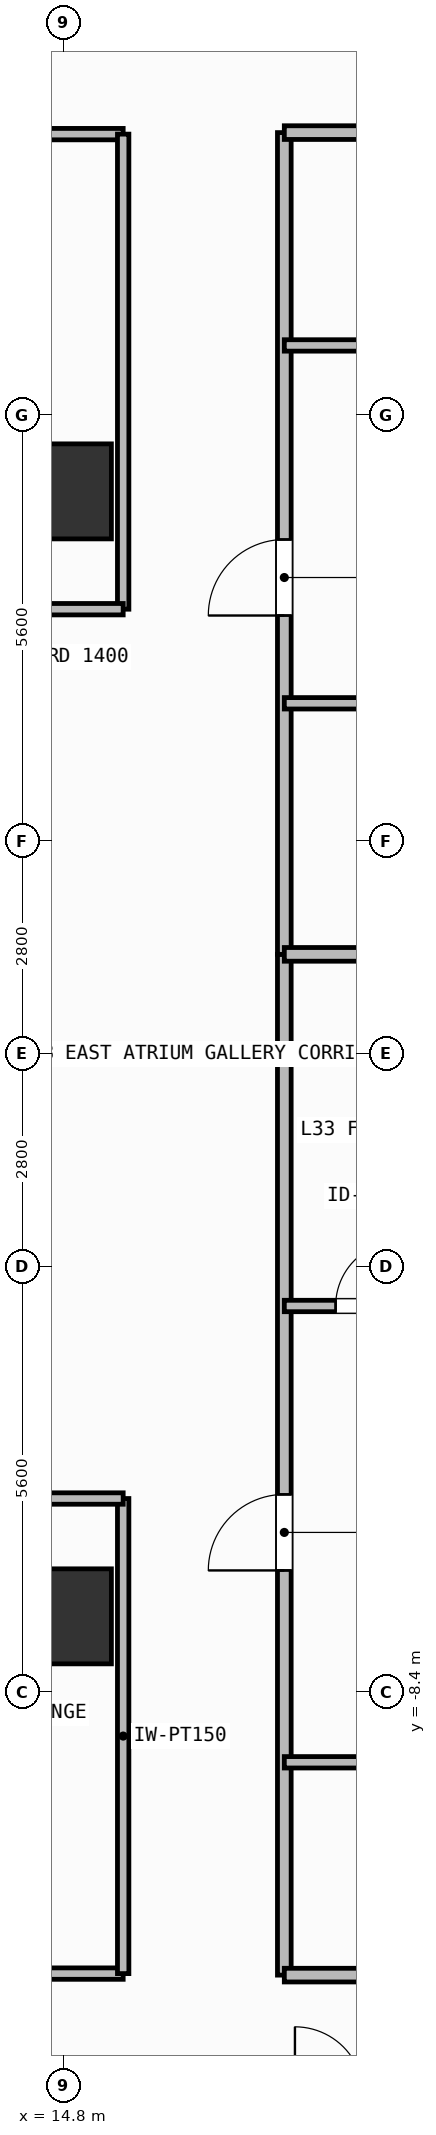
"""IFC4 building model, lengths in metres.
Left out: names, types, materials, properties, quantities, classifications, styles, units other than length and angle.
Written with IfcOpenShell. Run it as: python <this file> out.ifc"""

import sys

from ifc_helpers import new_model, si_unit, direction, frame, frame_2d, origin, origin_2d, place, context, subcontext, project, spatial, rectangle, extrude, element, fill, save


model = new_model("IFC4")
c1 = context("Model", 3, precision=1e-05, world=origin(), true_north=direction((0.0, 1.0)))
c2 = subcontext(c1, "Body", "Model", "MODEL_VIEW")
j1 = project(units=[si_unit("LENGTHUNIT", "METRE"), si_unit("PLANEANGLEUNIT", "RADIAN")], contexts=[c1])
p1 = place(None, origin())
s1 = spatial("IfcSite", under=j1, at=p1, CompositionType="ELEMENT")
p2 = place(p1, origin())
s2 = spatial("IfcBuilding", under=s1, at=p2, CompositionType="ELEMENT")
p3 = place(p2, frame((0.0, 0.0, 132.9)))
s3 = spatial("IfcBuildingStorey", under=s2, at=p3, CompositionType="ELEMENT", Elevation=132.9)
for number, where, z_axis, x_axis in (
    (1, (14.8, -7.4, 0.0), (0.0, 0.0, 1.0), (1.0, 0.0, 0.0)),
    (2, (14.8, 7.4, 0.0), (0.0, 0.0, 1.0), (1.0, 0.0, 0.0)),
):
    element("IfcColumn", number, at=place(p3, frame(where, z_axis=z_axis, x_axis=x_axis)), inside=s3, PredefinedType="COLUMN", context=c2, shape_type="SweptSolid", body=[
        extrude(rectangle(XDim=1.25, YDim=1.25, at=origin_2d()), origin(), (0.0, 0.0, 1.0), 3.9),
    ])
p4 = place(p3, frame((10.1, -12.1, 0.0), z_axis=(0.0, 0.0, 1.0), x_axis=(1.0, 0.0, 0.0)))
e3 = element("IfcWall", 3, at=p4, inside=s3, PredefinedType="PARTITIONING", context=c2, shape_type="SweptSolid", body=[
    extrude(rectangle(XDim=5.48, YDim=0.15, at=frame_2d((2.74, 0.0))), origin(), (0.0, 0.0, 1.0), 3.62),
])
p5 = place(p4, frame((2.29, 0.0, 0.0)))
e4 = element("IfcOpeningElement", 4, at=p5, cuts=e3, PredefinedType="OPENING", context=c2, shape_type="SweptSolid", body=[
    extrude(rectangle(XDim=0.9, YDim=2.1, at=frame_2d((0.45, 1.05))), frame((0.0, 0.085, 0.0), z_axis=(0.0, -1.0, 0.0), x_axis=(1.0, 0.0, 0.0)), (0.0, 0.0, 1.0), 0.17),
])
p6 = place(p3, frame((8.36, 12.1, 0.0), z_axis=(0.0, 0.0, 1.0), x_axis=(1.0, 0.0, 0.0)))
e5 = element("IfcWall", 5, at=p6, inside=s3, PredefinedType="PARTITIONING", context=c2, shape_type="SweptSolid", body=[
    extrude(rectangle(XDim=7.22, YDim=0.15, at=frame_2d((3.61, 0.0))), origin(), (0.0, 0.0, 1.0), 3.62),
])
p7 = place(p6, frame((3.513, 0.0, 0.0)))
e6 = element("IfcOpeningElement", 6, at=p7, cuts=e5, PredefinedType="OPENING", context=c2, shape_type="SweptSolid", body=[
    extrude(rectangle(XDim=0.9, YDim=2.1, at=frame_2d((0.45, 1.05))), frame((0.0, 0.085, 0.0), z_axis=(0.0, -1.0, 0.0), x_axis=(1.0, 0.0, 0.0)), (0.0, 0.0, 1.0), 0.17),
])
p8 = place(p3, frame((17.7, -12.12, 0.0), z_axis=(0.0, 0.0, 1.0), x_axis=(0.0, 1.0, 0.0)))
e7 = element("IfcWall", 7, at=p8, inside=s3, PredefinedType="PARTITIONING", context=c2, shape_type="SweptSolid", body=[
    extrude(rectangle(XDim=13.429, YDim=0.18, at=frame_2d((6.715, 0.0))), origin(), (0.0, 0.0, 1.0), 3.62),
])
p9 = place(p8, frame((5.324, 0.0, 0.0)))
e8 = element("IfcOpeningElement", 8, at=p9, cuts=e7, PredefinedType="OPENING", context=c2, shape_type="SweptSolid", body=[
    extrude(rectangle(XDim=1.0, YDim=2.2, at=frame_2d((0.5, 1.1))), frame((0.0, 0.1, 0.0), z_axis=(0.0, -1.0, 0.0), x_axis=(1.0, 0.0, 0.0)), (0.0, 0.0, 1.0), 0.2),
])
p10 = place(p3, frame((17.7, -3.317, 0.0), z_axis=(0.0, 0.0, 1.0), x_axis=(1.0, 0.0, 0.0)))
e9 = element("IfcWall", 9, at=p10, inside=s3, PredefinedType="PARTITIONING", context=c2, shape_type="SweptSolid", body=[
    extrude(rectangle(XDim=2.372, YDim=0.15, at=frame_2d((1.186, 0.0))), origin(), (0.0, 0.0, 1.0), 3.62),
])
p11 = place(p10, frame((0.675, 0.0, 0.0)))
e10 = element("IfcOpeningElement", 10, at=p11, cuts=e9, PredefinedType="OPENING", context=c2, shape_type="SweptSolid", body=[
    extrude(rectangle(XDim=0.85, YDim=2.1, at=frame_2d((0.425, 1.05))), frame((0.0, 0.085, 0.0), z_axis=(0.0, -1.0, 0.0), x_axis=(1.0, 0.0, 0.0)), (0.0, 0.0, 1.0), 0.17),
])
p12 = place(p3, frame((17.7, -9.32, 0.0), z_axis=(0.0, 0.0, 1.0), x_axis=(1.0, 0.0, 0.0)))
e11 = element("IfcWall", 11, at=p12, inside=s3, PredefinedType="PARTITIONING", context=c2, shape_type="SweptSolid", body=[
    extrude(rectangle(XDim=5.786, YDim=0.15, at=frame_2d((2.893, 0.0))), origin(), (0.0, 0.0, 1.0), 3.62),
])
p13 = place(p12, frame((2.468, 0.0, 0.0)))
e12 = element("IfcOpeningElement", 12, at=p13, cuts=e11, PredefinedType="OPENING", context=c2, shape_type="SweptSolid", body=[
    extrude(rectangle(XDim=0.85, YDim=2.1, at=frame_2d((0.425, 1.05))), frame((0.0, 0.085, 0.0), z_axis=(0.0, -1.0, 0.0), x_axis=(1.0, 0.0, 0.0)), (0.0, 0.0, 1.0), 0.17),
])
p14 = place(p3, frame((17.7, 1.309, 0.0), z_axis=(0.0, 0.0, 1.0), x_axis=(0.0, 1.0, 0.0)))
e13 = element("IfcWall", 13, at=p14, inside=s3, PredefinedType="PARTITIONING", context=c2, shape_type="SweptSolid", body=[
    extrude(rectangle(XDim=10.811, YDim=0.18, at=frame_2d((5.406, 0.0))), origin(), (0.0, 0.0, 1.0), 3.62),
])
p15 = place(p14, frame((4.458, 0.0, 0.0)))
e14 = element("IfcOpeningElement", 14, at=p15, cuts=e13, PredefinedType="OPENING", context=c2, shape_type="SweptSolid", body=[
    extrude(rectangle(XDim=1.0, YDim=2.2, at=frame_2d((0.5, 1.1))), frame((0.0, 0.1, 0.0), z_axis=(0.0, -1.0, 0.0), x_axis=(1.0, 0.0, 0.0)), (0.0, 0.0, 1.0), 0.2),
])
p16 = place(p3, frame((17.7, 9.32, 0.0), z_axis=(0.0, 0.0, 1.0), x_axis=(1.0, 0.0, 0.0)))
e15 = element("IfcWall", 15, at=p16, inside=s3, PredefinedType="PARTITIONING", context=c2, shape_type="SweptSolid", body=[
    extrude(rectangle(XDim=5.59, YDim=0.15, at=frame_2d((2.795, 0.0))), origin(), (0.0, 0.0, 1.0), 3.62),
])
p17 = place(p16, frame((2.458, 0.0, 0.0)))
e16 = element("IfcOpeningElement", 16, at=p17, cuts=e15, PredefinedType="OPENING", context=c2, shape_type="SweptSolid", body=[
    extrude(rectangle(XDim=0.85, YDim=2.1, at=frame_2d((0.425, 1.05))), frame((0.0, 0.085, 0.0), z_axis=(0.0, -1.0, 0.0), x_axis=(1.0, 0.0, 0.0)), (0.0, 0.0, 1.0), 0.17),
])
p18 = place(p3, frame((17.7, 4.612, 0.0), z_axis=(0.0, 0.0, 1.0), x_axis=(1.0, 0.0, 0.0)))
e17 = element("IfcWall", 17, at=p18, inside=s3, PredefinedType="PARTITIONING", context=c2, shape_type="SweptSolid", body=[
    extrude(rectangle(XDim=5.59, YDim=0.15, at=frame_2d((2.795, 0.0))), origin(), (0.0, 0.0, 1.0), 3.62),
])
p19 = place(p18, frame((2.281, 0.0, 0.0)))
e18 = element("IfcOpeningElement", 18, at=p19, cuts=e17, PredefinedType="OPENING", context=c2, shape_type="SweptSolid", body=[
    extrude(rectangle(XDim=0.85, YDim=2.1, at=frame_2d((0.425, 1.05))), frame((0.0, 0.085, 0.0), z_axis=(0.0, -1.0, 0.0), x_axis=(1.0, 0.0, 0.0)), (0.0, 0.0, 1.0), 0.17),
])
p20 = place(p3, frame((15.58, -12.1, 0.0), z_axis=(0.0, 0.0, 1.0), x_axis=(0.0, 1.0, 0.0)))
e19 = element("IfcWall", 19, at=p20, inside=s3, PredefinedType="PARTITIONING", context=c2, shape_type="SweptSolid", body=[
    extrude(rectangle(XDim=6.25, YDim=0.15, at=frame_2d((3.125, 0.0))), origin(), (0.0, 0.0, 1.0), 3.62),
])
p21 = place(p3, frame((8.96, -5.85, 0.0), z_axis=(0.0, 0.0, 1.0), x_axis=(1.0, 0.0, 0.0)))
e20 = element("IfcWall", 20, at=p21, inside=s3, PredefinedType="PARTITIONING", context=c2, shape_type="SweptSolid", body=[
    extrude(rectangle(XDim=6.62, YDim=0.15, at=frame_2d((3.31, 0.0))), origin(), (0.0, 0.0, 1.0), 3.62),
])
p22 = place(p3, frame((15.58, 5.85, 0.0), z_axis=(0.0, 0.0, 1.0), x_axis=(0.0, 1.0, 0.0)))
e21 = element("IfcWall", 21, at=p22, inside=s3, PredefinedType="PARTITIONING", context=c2, shape_type="SweptSolid", body=[
    extrude(rectangle(XDim=6.25, YDim=0.15, at=frame_2d((3.125, 0.0))), origin(), (0.0, 0.0, 1.0), 3.62),
])
p23 = place(p3, frame((8.96, 5.85, 0.0), z_axis=(0.0, 0.0, 1.0), x_axis=(1.0, 0.0, 0.0)))
e22 = element("IfcWall", 22, at=p23, inside=s3, PredefinedType="PARTITIONING", context=c2, shape_type="SweptSolid", body=[
    extrude(rectangle(XDim=6.62, YDim=0.15, at=frame_2d((3.31, 0.0))), origin(), (0.0, 0.0, 1.0), 3.62),
])
for number, where, z_axis, x_axis in (
    (23, (17.7, 1.309, 0.0), (0.0, 0.0, 1.0), (1.0, 0.0, 0.0)),
    (24, (17.7, -12.12, 0.0), (0.0, 0.0, 1.0), (1.0, 0.0, 0.0)),
    (25, (17.7, 12.12, 0.0), (0.0, 0.0, 1.0), (1.0, 0.0, 0.0)),
):
    element("IfcWall", number, at=place(p3, frame(where, z_axis=z_axis, x_axis=x_axis)), inside=s3, PredefinedType="PARTITIONING", context=c2, shape_type="SweptSolid", body=[
        extrude(rectangle(XDim=9.83, YDim=0.18, at=frame_2d((4.915, 0.0))), origin(), (0.0, 0.0, 1.0), 3.62),
    ])
p24 = place(p9, origin())
e26 = element("IfcDoor", 26, at=p24, inside=s3, OperationType="SINGLE_SWING_LEFT", PredefinedType="DOOR", context=c2, shape_type="SweptSolid", body=[
    extrude(rectangle(XDim=1.0, YDim=2.2, at=frame_2d((0.5, 1.1))), frame((0.0, 0.025, 0.0), z_axis=(0.0, -1.0, 0.0), x_axis=(1.0, 0.0, 0.0)), (0.0, 0.0, 1.0), 0.05),
])
fill(e8, e26)
p25 = place(p11, origin())
e27 = element("IfcDoor", 27, at=p25, inside=s3, OperationType="SINGLE_SWING_RIGHT", PredefinedType="DOOR", context=c2, shape_type="SweptSolid", body=[
    extrude(rectangle(XDim=0.85, YDim=2.1, at=frame_2d((0.425, 1.05))), frame((0.0, 0.025, 0.0), z_axis=(0.0, -1.0, 0.0), x_axis=(1.0, 0.0, 0.0)), (0.0, 0.0, 1.0), 0.05),
])
fill(e10, e27)
p26 = place(p15, origin())
e28 = element("IfcDoor", 28, at=p26, inside=s3, OperationType="SINGLE_SWING_LEFT", PredefinedType="DOOR", context=c2, shape_type="SweptSolid", body=[
    extrude(rectangle(XDim=1.0, YDim=2.2, at=frame_2d((0.5, 1.1))), frame((0.0, 0.025, 0.0), z_axis=(0.0, -1.0, 0.0), x_axis=(1.0, 0.0, 0.0)), (0.0, 0.0, 1.0), 0.05),
])
fill(e14, e28)
save(model, sys.argv[1])
